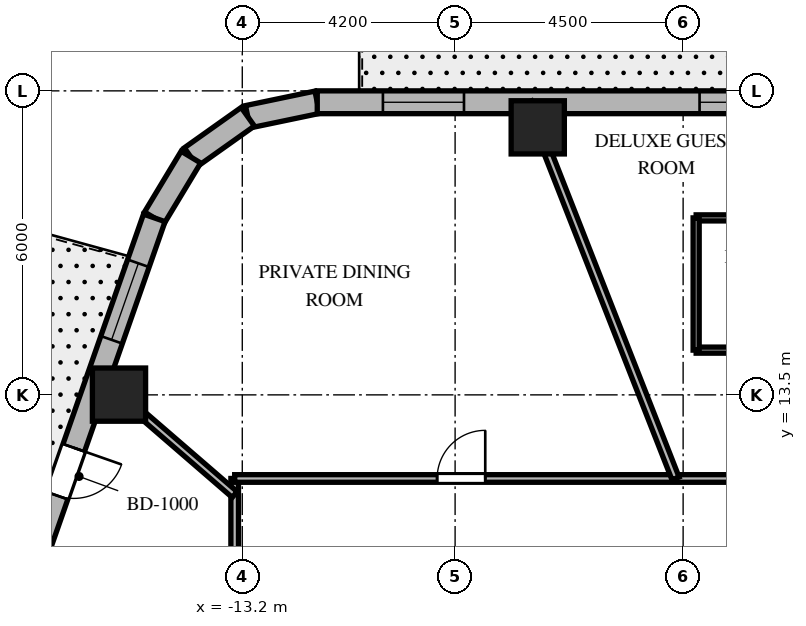
"""IFC4 building model, lengths in metres.
Left out: names, types, materials, properties, quantities, classifications, styles, units other than length and angle.
Written with IfcOpenShell. Run it as: python <this file> out.ifc"""

import sys

from ifc_helpers import new_model, si_unit, direction, frame, frame_2d, origin, origin_2d, place, context, subcontext, project, spatial, rectangle, extrude, element, fill, save


model = new_model("IFC4")
c1 = context("Model", 3, precision=1e-05, world=origin(), true_north=direction((0.0, 1.0)))
c2 = subcontext(c1, "Body", "Model", "MODEL_VIEW")
j1 = project(units=[si_unit("LENGTHUNIT", "METRE"), si_unit("PLANEANGLEUNIT", "RADIAN")], contexts=[c1])
p1 = place(None, origin())
s1 = spatial("IfcSite", under=j1, at=p1, CompositionType="ELEMENT")
p2 = place(p1, origin())
s2 = spatial("IfcBuilding", under=s1, at=p2, CompositionType="ELEMENT")
p3 = place(p2, frame((0.0, 0.0, 162.8)))
s3 = spatial("IfcBuildingStorey", under=s2, at=p3, CompositionType="ELEMENT", Elevation=162.8)
for number, where, z_axis, x_axis in (
    (1, (-7.369, 18.78, 0.0), (0.0, 0.0, 1.0), (1.0, 0.0, 0.0)),
    (2, (-15.633, 13.505, 0.0), (0.0, 0.0, 1.0), (1.0, 0.0, 0.0)),
):
    element("IfcColumn", number, at=place(p3, frame(where, z_axis=z_axis, x_axis=x_axis)), inside=s3, PredefinedType="COLUMN", context=c2, shape_type="SweptSolid", body=[
        extrude(rectangle(XDim=1.05, YDim=1.05, at=origin_2d()), origin(), (0.0, 0.0, 1.0), 3.7),
    ])
p4 = place(p3, frame((-11.72, 19.275, 0.0), z_axis=(0.0, 0.0, 1.0), x_axis=(-0.97893106758, -0.204191001093, 0.0)))
e3 = element("IfcWall", 3, at=p4, inside=s3, PredefinedType="SOLIDWALL", context=c2, shape_type="SweptSolid", body=[
    extrude(rectangle(XDim=1.4, YDim=0.45, at=frame_2d((0.7, 0.0))), origin(), (0.0, 0.0, 1.0), 3.4),
])
p5 = place(p3, frame((-13.091, 18.989, 0.0), z_axis=(0.0, 0.0, 1.0), x_axis=(-0.815574637848, -0.578651890258, 0.0)))
e4 = element("IfcWall", 4, at=p5, inside=s3, PredefinedType="SOLIDWALL", context=c2, shape_type="SweptSolid", body=[
    extrude(rectangle(XDim=1.377, YDim=0.45, at=frame_2d((0.688, 0.0))), origin(), (0.0, 0.0, 1.0), 3.4),
])
p6 = place(p3, frame((-14.214, 18.192, 0.0), z_axis=(0.0, 0.0, 1.0), x_axis=(-0.516340945502, -0.856383108193, 0.0)))
e5 = element("IfcWall", 5, at=p6, inside=s3, PredefinedType="SOLIDWALL", context=c2, shape_type="SweptSolid", body=[
    extrude(rectangle(XDim=1.4, YDim=0.45, at=frame_2d((0.7, 0.0))), origin(), (0.0, 0.0, 1.0), 3.4),
])
p7 = place(p3, frame((10.108, 19.275, 0.0), z_axis=(0.0, 0.0, 1.0), x_axis=(-1.0, 0.0, 0.0)))
e6 = element("IfcWall", 6, at=p7, inside=s3, PredefinedType="SOLIDWALL", context=c2, shape_type="SweptSolid", body=[
    extrude(rectangle(XDim=21.829, YDim=0.45, at=frame_2d((10.915, 0.0))), origin(), (0.0, 0.0, 1.0), 3.4),
])
p8 = place(p7, frame((5.503, 0.0, 0.0)))
e7 = element("IfcOpeningElement", 7, at=p8, cuts=e6, PredefinedType="OPENING", context=c2, shape_type="SweptSolid", body=[
    extrude(rectangle(XDim=0.95, YDim=2.15, at=frame_2d((0.475, 1.075))), frame((0.0, 0.235, 0.0), z_axis=(0.0, -1.0, 0.0), x_axis=(1.0, 0.0, 0.0)), (0.0, 0.0, 1.0), 0.47),
])
p9 = place(p7, frame((1.297, 0.0, 0.8)))
e8 = element("IfcOpeningElement", 8, at=p9, cuts=e6, PredefinedType="OPENING", context=c2, shape_type="SweptSolid", body=[
    extrude(rectangle(XDim=1.6, YDim=1.75, at=frame_2d((0.8, 0.875))), frame((0.0, 0.235, 0.0), z_axis=(0.0, -1.0, 0.0), x_axis=(1.0, 0.0, 0.0)), (0.0, 0.0, 1.0), 0.47),
])
p10 = place(p7, frame((7.402, 0.0, 0.8)))
e9 = element("IfcOpeningElement", 9, at=p10, cuts=e6, PredefinedType="OPENING", context=c2, shape_type="SweptSolid", body=[
    extrude(rectangle(XDim=1.6, YDim=1.75, at=frame_2d((0.8, 0.875))), frame((0.0, 0.235, 0.0), z_axis=(0.0, -1.0, 0.0), x_axis=(1.0, 0.0, 0.0)), (0.0, 0.0, 1.0), 0.47),
])
p11 = place(p7, frame((12.684, 0.0, 0.8)))
e10 = element("IfcOpeningElement", 10, at=p11, cuts=e6, PredefinedType="OPENING", context=c2, shape_type="SweptSolid", body=[
    extrude(rectangle(XDim=1.6, YDim=1.75, at=frame_2d((0.8, 0.875))), frame((0.0, 0.235, 0.0), z_axis=(0.0, -1.0, 0.0), x_axis=(1.0, 0.0, 0.0)), (0.0, 0.0, 1.0), 0.47),
])
p12 = place(p7, frame((18.933, 0.0, 0.8)))
e11 = element("IfcOpeningElement", 11, at=p12, cuts=e6, PredefinedType="OPENING", context=c2, shape_type="SweptSolid", body=[
    extrude(rectangle(XDim=1.6, YDim=1.75, at=frame_2d((0.8, 0.875))), frame((0.0, 0.235, 0.0), z_axis=(0.0, -1.0, 0.0), x_axis=(1.0, 0.0, 0.0)), (0.0, 0.0, 1.0), 0.47),
])
p13 = place(p3, frame((-14.937, 16.993, 0.0), z_axis=(0.0, 0.0, 1.0), x_axis=(-0.330431575061, -0.943829949834, 0.0)))
e12 = element("IfcWall", 12, at=p13, inside=s3, PredefinedType="SOLIDWALL", context=c2, shape_type="SweptSolid", body=[
    extrude(rectangle(XDim=17.689, YDim=0.45, at=frame_2d((8.844, 0.0))), origin(), (0.0, 0.0, 1.0), 3.4),
])
p14 = place(p13, frame((4.807, 0.0, 0.0)))
e13 = element("IfcOpeningElement", 13, at=p14, cuts=e12, PredefinedType="OPENING", context=c2, shape_type="SweptSolid", body=[
    extrude(rectangle(XDim=1.0, YDim=2.15, at=frame_2d((0.5, 1.075))), frame((0.0, 0.235, 0.0), z_axis=(0.0, -1.0, 0.0), x_axis=(1.0, 0.0, 0.0)), (0.0, 0.0, 1.0), 0.47),
])
p15 = place(p13, frame((0.95, 0.0, 0.8)))
e14 = element("IfcOpeningElement", 14, at=p15, cuts=e12, PredefinedType="OPENING", context=c2, shape_type="SweptSolid", body=[
    extrude(rectangle(XDim=1.6, YDim=1.75, at=frame_2d((0.8, 0.875))), frame((0.0, 0.235, 0.0), z_axis=(0.0, -1.0, 0.0), x_axis=(1.0, 0.0, 0.0)), (0.0, 0.0, 1.0), 0.47),
])
p16 = place(p13, frame((6.623, 0.0, 0.8)))
e15 = element("IfcOpeningElement", 15, at=p16, cuts=e12, PredefinedType="OPENING", context=c2, shape_type="SweptSolid", body=[
    extrude(rectangle(XDim=1.6, YDim=1.75, at=frame_2d((0.8, 0.875))), frame((0.0, 0.235, 0.0), z_axis=(0.0, -1.0, 0.0), x_axis=(1.0, 0.0, 0.0)), (0.0, 0.0, 1.0), 0.47),
])
p17 = place(p13, frame((10.849, 0.0, 0.8)))
e16 = element("IfcOpeningElement", 16, at=p17, cuts=e12, PredefinedType="OPENING", context=c2, shape_type="SweptSolid", body=[
    extrude(rectangle(XDim=1.6, YDim=1.75, at=frame_2d((0.8, 0.875))), frame((0.0, 0.235, 0.0), z_axis=(0.0, -1.0, 0.0), x_axis=(1.0, 0.0, 0.0)), (0.0, 0.0, 1.0), 0.47),
])
p18 = place(p13, frame((15.084, 0.0, 0.8)))
e17 = element("IfcOpeningElement", 17, at=p18, cuts=e12, PredefinedType="OPENING", context=c2, shape_type="SweptSolid", body=[
    extrude(rectangle(XDim=1.6, YDim=1.75, at=frame_2d((0.8, 0.875))), frame((0.0, 0.235, 0.0), z_axis=(0.0, -1.0, 0.0), x_axis=(1.0, 0.0, 0.0)), (0.0, 0.0, 1.0), 0.47),
])
p19 = place(p3, frame((-13.35, -11.85, 0.0), z_axis=(0.0, 0.0, 1.0), x_axis=(0.0, 1.0, 0.0)))
e18 = element("IfcWall", 18, at=p19, inside=s3, PredefinedType="PARTITIONING", context=c2, shape_type="SweptSolid", body=[
    extrude(rectangle(XDim=23.7, YDim=0.15, at=frame_2d((11.85, 0.0))), origin(), (0.0, 0.0, 1.0), 2.84),
])
p20 = place(p19, frame((20.136, 0.0, 0.0)))
e19 = element("IfcOpeningElement", 19, at=p20, cuts=e18, PredefinedType="OPENING", context=c2, shape_type="SweptSolid", body=[
    extrude(rectangle(XDim=0.9, YDim=2.03, at=frame_2d((0.45, 1.015))), frame((0.0, 0.085, 0.0), z_axis=(0.0, -1.0, 0.0), x_axis=(1.0, 0.0, 0.0)), (0.0, 0.0, 1.0), 0.17),
])
p21 = place(p19, frame((15.551, 0.0, 0.0)))
e20 = element("IfcOpeningElement", 20, at=p21, cuts=e18, PredefinedType="OPENING", context=c2, shape_type="SweptSolid", body=[
    extrude(rectangle(XDim=0.9, YDim=2.03, at=frame_2d((0.45, 1.015))), frame((0.0, 0.085, 0.0), z_axis=(0.0, -1.0, 0.0), x_axis=(1.0, 0.0, 0.0)), (0.0, 0.0, 1.0), 0.17),
])
p22 = place(p19, frame((12.494, 0.0, 0.0)))
e21 = element("IfcOpeningElement", 21, at=p22, cuts=e18, PredefinedType="OPENING", context=c2, shape_type="SweptSolid", body=[
    extrude(rectangle(XDim=0.9, YDim=2.03, at=frame_2d((0.45, 1.015))), frame((0.0, 0.085, 0.0), z_axis=(0.0, -1.0, 0.0), x_axis=(1.0, 0.0, 0.0)), (0.0, 0.0, 1.0), 0.17),
])
p23 = place(p19, frame((9.424, 0.0, 0.0)))
e22 = element("IfcOpeningElement", 22, at=p23, cuts=e18, PredefinedType="OPENING", context=c2, shape_type="SweptSolid", body=[
    extrude(rectangle(XDim=0.95, YDim=2.03, at=frame_2d((0.475, 1.015))), frame((0.0, 0.085, 0.0), z_axis=(0.0, -1.0, 0.0), x_axis=(1.0, 0.0, 0.0)), (0.0, 0.0, 1.0), 0.17),
])
p24 = place(p19, frame((3.765, 0.0, 0.0)))
e23 = element("IfcOpeningElement", 23, at=p24, cuts=e18, PredefinedType="OPENING", context=c2, shape_type="SweptSolid", body=[
    extrude(rectangle(XDim=0.9, YDim=2.03, at=frame_2d((0.45, 1.015))), frame((0.0, 0.085, 0.0), z_axis=(0.0, -1.0, 0.0), x_axis=(1.0, 0.0, 0.0)), (0.0, 0.0, 1.0), 0.17),
])
p25 = place(p3, frame((-13.35, 11.85, 0.0), z_axis=(0.0, 0.0, 1.0), x_axis=(1.0, 0.0, 0.0)))
e24 = element("IfcWall", 24, at=p25, inside=s3, PredefinedType="PARTITIONING", context=c2, shape_type="SweptSolid", body=[
    extrude(rectangle(XDim=26.7, YDim=0.15, at=frame_2d((13.35, 0.0))), origin(), (0.0, 0.0, 1.0), 2.84),
])
p26 = place(p25, frame((20.682, 0.0, 0.0)))
e25 = element("IfcOpeningElement", 25, at=p26, cuts=e24, PredefinedType="OPENING", context=c2, shape_type="SweptSolid", body=[
    extrude(rectangle(XDim=0.95, YDim=2.03, at=frame_2d((0.475, 1.015))), frame((0.0, 0.085, 0.0), z_axis=(0.0, -1.0, 0.0), x_axis=(1.0, 0.0, 0.0)), (0.0, 0.0, 1.0), 0.17),
])
p27 = place(p25, frame((14.708, 0.0, 0.0)))
e26 = element("IfcOpeningElement", 26, at=p27, cuts=e24, PredefinedType="OPENING", context=c2, shape_type="SweptSolid", body=[
    extrude(rectangle(XDim=0.95, YDim=2.03, at=frame_2d((0.475, 1.015))), frame((0.0, 0.085, 0.0), z_axis=(0.0, -1.0, 0.0), x_axis=(1.0, 0.0, 0.0)), (0.0, 0.0, 1.0), 0.17),
])
p28 = place(p25, frame((10.553, 0.0, 0.0)))
e27 = element("IfcOpeningElement", 27, at=p28, cuts=e24, PredefinedType="OPENING", context=c2, shape_type="SweptSolid", body=[
    extrude(rectangle(XDim=0.95, YDim=2.03, at=frame_2d((0.475, 1.015))), frame((0.0, 0.085, 0.0), z_axis=(0.0, -1.0, 0.0), x_axis=(1.0, 0.0, 0.0)), (0.0, 0.0, 1.0), 0.17),
])
p29 = place(p25, frame((3.995, 0.0, 0.0)))
e28 = element("IfcOpeningElement", 28, at=p29, cuts=e24, PredefinedType="OPENING", context=c2, shape_type="SweptSolid", body=[
    extrude(rectangle(XDim=0.95, YDim=2.03, at=frame_2d((0.475, 1.015))), frame((0.0, 0.085, 0.0), z_axis=(0.0, -1.0, 0.0), x_axis=(1.0, 0.0, 0.0)), (0.0, 0.0, 1.0), 0.17),
])
p30 = place(p3, frame((-4.65, 11.85, 0.0), z_axis=(0.0, 0.0, 1.0), x_axis=(-0.365265947993, 0.930903210456, 0.0)))
e29 = element("IfcWall", 29, at=p30, inside=s3, PredefinedType="PARTITIONING", context=c2, shape_type="SweptSolid", body=[
    extrude(rectangle(XDim=7.976, YDim=0.15, at=frame_2d((3.988, 0.0))), origin(), (0.0, 0.0, 1.0), 2.64),
])
p31 = place(p3, frame((-13.35, 11.533, 0.0), z_axis=(0.0, 0.0, 1.0), x_axis=(-0.756711647314, 0.65374879183, 0.0)))
e30 = element("IfcWall", 30, at=p31, inside=s3, PredefinedType="PARTITIONING", context=c2, shape_type="SweptSolid", body=[
    extrude(rectangle(XDim=3.55, YDim=0.15, at=frame_2d((1.775, 0.0))), origin(), (0.0, 0.0, 1.0), 2.64),
])
p32 = place(p3, frame((-4.243, 14.383, 0.0), z_axis=(0.0, 0.0, 1.0), x_axis=(1.0, 0.0, 0.0)))
e31 = element("IfcWall", 31, at=p32, inside=s3, PredefinedType="PARTITIONING", context=c2, shape_type="SweptSolid", body=[
    extrude(rectangle(XDim=2.44, YDim=0.12, at=frame_2d((1.22, 0.0))), origin(), (0.0, 0.0, 1.0), 3.4),
])
p33 = place(p32, frame((0.795, 0.0, 0.0)))
e32 = element("IfcOpeningElement", 32, at=p33, cuts=e31, PredefinedType="OPENING", context=c2, shape_type="SweptSolid", body=[
    extrude(rectangle(XDim=0.85, YDim=2.03, at=frame_2d((0.425, 1.015))), frame((0.0, 0.07, 0.0), z_axis=(0.0, -1.0, 0.0), x_axis=(1.0, 0.0, 0.0)), (0.0, 0.0, 1.0), 0.14),
])
p34 = place(p3, frame((-1.803, 16.993, 0.0), z_axis=(0.0, 0.0, 1.0), x_axis=(-1.0, 0.0, 0.0)))
e33 = element("IfcWall", 33, at=p34, inside=s3, PredefinedType="PARTITIONING", context=c2, shape_type="SweptSolid", body=[
    extrude(rectangle(XDim=2.44, YDim=0.12, at=frame_2d((1.22, 0.0))), origin(), (0.0, 0.0, 1.0), 3.4),
])
p35 = place(p3, frame((-4.243, 16.993, 0.0), z_axis=(0.0, 0.0, 1.0), x_axis=(0.0, -1.0, 0.0)))
e34 = element("IfcWall", 34, at=p35, inside=s3, PredefinedType="PARTITIONING", context=c2, shape_type="SweptSolid", body=[
    extrude(rectangle(XDim=2.61, YDim=0.12, at=frame_2d((1.305, 0.0))), origin(), (0.0, 0.0, 1.0), 2.84),
])
p36 = place(p11, origin())
e35 = element("IfcWindow", 35, at=p36, inside=s3, PartitioningType="SINGLE_PANEL", PredefinedType="WINDOW", context=c2, shape_type="SweptSolid", body=[
    extrude(rectangle(XDim=1.6, YDim=1.75, at=frame_2d((0.8, 0.875))), frame((0.0, 0.03, 0.0), z_axis=(0.0, -1.0, 0.0), x_axis=(1.0, 0.0, 0.0)), (0.0, 0.0, 1.0), 0.06),
])
fill(e10, e35)
p37 = place(p12, origin())
e36 = element("IfcWindow", 36, at=p37, inside=s3, PartitioningType="SINGLE_PANEL", PredefinedType="WINDOW", context=c2, shape_type="SweptSolid", body=[
    extrude(rectangle(XDim=1.6, YDim=1.75, at=frame_2d((0.8, 0.875))), frame((0.0, 0.03, 0.0), z_axis=(0.0, -1.0, 0.0), x_axis=(1.0, 0.0, 0.0)), (0.0, 0.0, 1.0), 0.06),
])
fill(e11, e36)
p38 = place(p14, origin())
e37 = element("IfcDoor", 37, at=p38, inside=s3, OperationType="SINGLE_SWING_LEFT", PredefinedType="DOOR", context=c2, shape_type="SweptSolid", body=[
    extrude(rectangle(XDim=1.0, YDim=2.15, at=frame_2d((0.5, 1.075))), frame((0.0, 0.025, 0.0), z_axis=(0.0, -1.0, 0.0), x_axis=(1.0, 0.0, 0.0)), (0.0, 0.0, 1.0), 0.05),
])
fill(e13, e37)
p39 = place(p15, origin())
e38 = element("IfcWindow", 38, at=p39, inside=s3, PartitioningType="SINGLE_PANEL", PredefinedType="WINDOW", context=c2, shape_type="SweptSolid", body=[
    extrude(rectangle(XDim=1.6, YDim=1.75, at=frame_2d((0.8, 0.875))), frame((0.0, 0.03, 0.0), z_axis=(0.0, -1.0, 0.0), x_axis=(1.0, 0.0, 0.0)), (0.0, 0.0, 1.0), 0.06),
])
fill(e14, e38)
p40 = place(p29, origin())
e39 = element("IfcDoor", 39, at=p40, inside=s3, OperationType="SINGLE_SWING_RIGHT", PredefinedType="DOOR", context=c2, shape_type="SweptSolid", body=[
    extrude(rectangle(XDim=0.95, YDim=2.03, at=frame_2d((0.475, 1.015))), frame((0.0, 0.025, 0.0), z_axis=(0.0, -1.0, 0.0), x_axis=(1.0, 0.0, 0.0)), (0.0, 0.0, 1.0), 0.05),
])
fill(e28, e39)
save(model, sys.argv[1])
